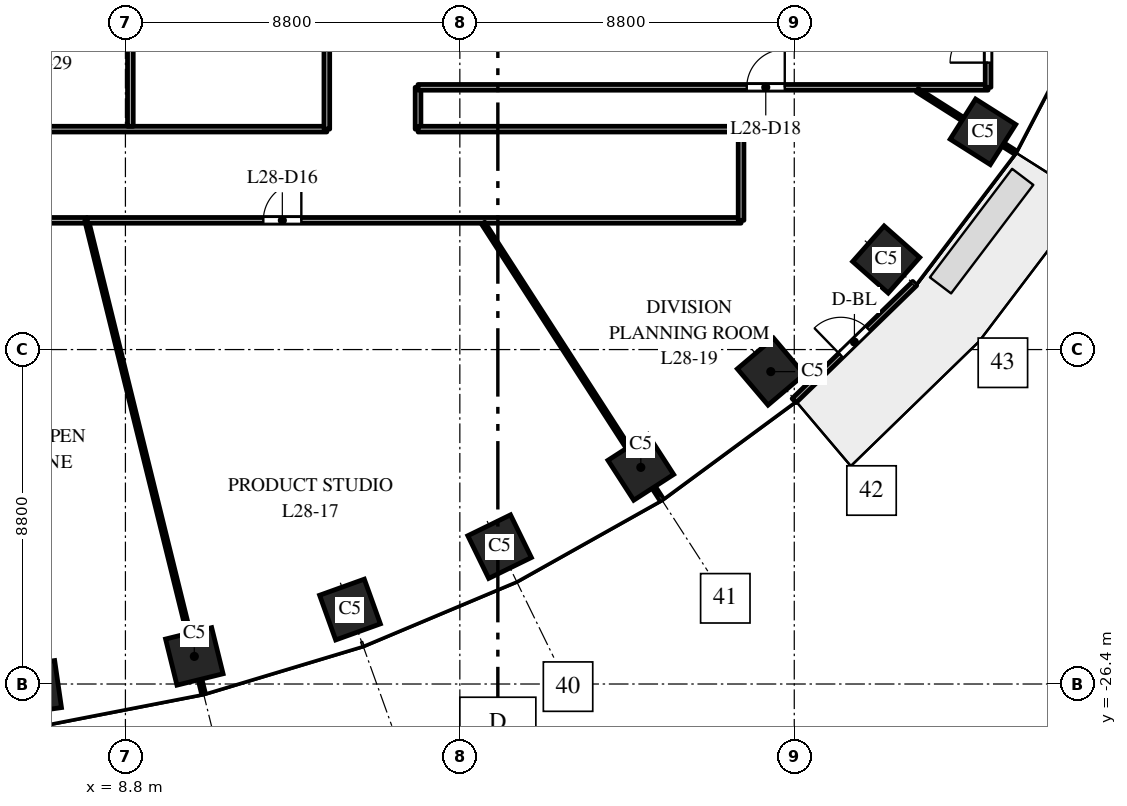
"""IFC4 building model, lengths in metres.
Left out: names, types, materials, properties, quantities, classifications, styles, units other than length and angle.
Written with IfcOpenShell. Run it as: python <this file> out.ifc"""

import sys

from ifc_helpers import new_model, si_unit, direction, frame, frame_2d, origin, origin_2d, place, context, subcontext, project, spatial, rectangle, extrude, element, fill, save


model = new_model("IFC4")
c1 = context("Model", 3, precision=1e-05, world=origin(), true_north=direction((0.0, 1.0)))
c2 = subcontext(c1, "Body", "Model", "MODEL_VIEW")
j1 = project(units=[si_unit("LENGTHUNIT", "METRE"), si_unit("PLANEANGLEUNIT", "RADIAN")], contexts=[c1])
p1 = place(None, origin())
s1 = spatial("IfcSite", under=j1, at=p1, CompositionType="ELEMENT")
p2 = place(p1, origin())
s2 = spatial("IfcBuilding", under=s1, at=p2, CompositionType="ELEMENT")
p3 = place(p2, frame((0.0, 0.0, 124.0)))
s3 = spatial("IfcBuildingStorey", under=s2, at=p3, CompositionType="ELEMENT", Elevation=124.0)
for number, where, z_axis, x_axis in (
    (1, (6.409, -26.491, 0.0), (0.0, 0.0, 1.0), (0.99, 0.143, 0.0)),
    (2, (10.613, -25.674, 0.0), (0.0, 0.0, 1.0), (0.971, 0.24, 0.0)),
    (3, (14.709, -24.441, 0.0), (0.0, 0.0, 1.0), (0.941, 0.338, 0.0)),
    (4, (18.646, -22.785, 0.0), (0.0, 0.0, 1.0), (0.898, 0.439, 0.0)),
    (5, (22.362, -20.7, 0.0), (0.0, 0.0, 1.0), (0.84, 0.542, 0.0)),
    (6, (25.783, -18.18, 0.0), (0.0, 0.0, 1.0), (0.763, 0.646, 0.0)),
    (7, (28.819, -15.23, 0.0), (0.0, 0.0, 1.0), (0.663, 0.749, 0.0)),
    (8, (31.365, -11.871, 0.0), (0.0, 0.0, 1.0), (0.535, 0.845, 0.0)),
):
    element("IfcColumn", number, at=place(p3, frame(where, z_axis=z_axis, x_axis=x_axis)), inside=s3, PredefinedType="COLUMN", context=c2, shape_type="SweptSolid", body=[
        extrude(rectangle(XDim=1.25, YDim=1.25, at=origin_2d()), origin(), (0.0, 0.0, 1.0), 4.0),
    ])
p4 = place(p3, frame((26.396, -18.943, 0.0), z_axis=(0.0, 0.0, 1.0), x_axis=(0.717214761864, 0.696852197647, 0.0)))
e9 = element("IfcWall", 9, at=p4, inside=s3, PredefinedType="STANDARD", context=c2, shape_type="SweptSolid", body=[
    extrude(rectangle(XDim=4.424, YDim=0.15, at=frame_2d((2.212, 0.0))), origin(), (0.0, 0.0, 1.0), 3.7),
])
p5 = place(p4, frame((1.712, 0.0, 0.0)))
e10 = element("IfcOpeningElement", 10, at=p5, cuts=e9, PredefinedType="OPENING", context=c2, shape_type="SweptSolid", body=[
    extrude(rectangle(XDim=1.0, YDim=2.4, at=frame_2d((0.5, 1.2))), frame((0.0, 0.085, 0.0), z_axis=(0.0, -1.0, 0.0), x_axis=(1.0, 0.0, 0.0)), (0.0, 0.0, 1.0), 0.17),
])
p6 = place(p3, frame((-14.1, -11.8, 0.0), z_axis=(0.0, 0.0, 1.0), x_axis=(1.0, 0.0, 0.0)))
e11 = element("IfcWall", 11, at=p6, inside=s3, PredefinedType="PARTITIONING", context=c2, shape_type="SweptSolid", body=[
    extrude(rectangle(XDim=28.2, YDim=0.15, at=frame_2d((14.1, 0.0))), origin(), (0.0, 0.0, 1.0), 2.85),
])
p7 = place(p6, frame((6.03, 0.0, 0.0)))
e12 = element("IfcOpeningElement", 12, at=p7, cuts=e11, PredefinedType="OPENING", context=c2, shape_type="SweptSolid", body=[
    extrude(rectangle(XDim=1.0, YDim=2.1, at=frame_2d((0.5, 1.05))), frame((0.0, 0.085, 0.0), z_axis=(0.0, -1.0, 0.0), x_axis=(1.0, 0.0, 0.0)), (0.0, 0.0, 1.0), 0.17),
])
p8 = place(p6, frame((10.73, 0.0, 0.0)))
e13 = element("IfcOpeningElement", 13, at=p8, cuts=e11, PredefinedType="OPENING", context=c2, shape_type="SweptSolid", body=[
    extrude(rectangle(XDim=1.0, YDim=2.1, at=frame_2d((0.5, 1.05))), frame((0.0, 0.085, 0.0), z_axis=(0.0, -1.0, 0.0), x_axis=(1.0, 0.0, 0.0)), (0.0, 0.0, 1.0), 0.17),
])
p9 = place(p6, frame((15.43, 0.0, 0.0)))
e14 = element("IfcOpeningElement", 14, at=p9, cuts=e11, PredefinedType="OPENING", context=c2, shape_type="SweptSolid", body=[
    extrude(rectangle(XDim=1.0, YDim=2.1, at=frame_2d((0.5, 1.05))), frame((0.0, 0.085, 0.0), z_axis=(0.0, -1.0, 0.0), x_axis=(1.0, 0.0, 0.0)), (0.0, 0.0, 1.0), 0.17),
])
p10 = place(p3, frame((0.563, -14.2, 0.0), z_axis=(0.0, 0.0, 1.0), x_axis=(1.0, 0.0, 0.0)))
e15 = element("IfcWall", 15, at=p10, inside=s3, PredefinedType="PARTITIONING", context=c2, shape_type="SweptSolid", body=[
    extrude(rectangle(XDim=7.216, YDim=0.15, at=frame_2d((3.608, 0.0))), origin(), (0.0, 0.0, 1.0), 2.85),
])
p11 = place(p10, frame((3.15, 0.0, 0.0)))
e16 = element("IfcOpeningElement", 16, at=p11, cuts=e15, PredefinedType="OPENING", context=c2, shape_type="SweptSolid", body=[
    extrude(rectangle(XDim=1.0, YDim=2.1, at=frame_2d((0.5, 1.05))), frame((0.0, 0.085, 0.0), z_axis=(0.0, -1.0, 0.0), x_axis=(1.0, 0.0, 0.0)), (0.0, 0.0, 1.0), 0.17),
])
p12 = place(p3, frame((7.779, -14.2, 0.0), z_axis=(0.0, 0.0, 1.0), x_axis=(0.239778914736, -0.970827519206, 0.0)))
e17 = element("IfcWall", 17, at=p12, inside=s3, PredefinedType="PARTITIONING", context=c2, shape_type="SweptSolid", body=[
    extrude(rectangle(XDim=12.82, YDim=0.1, at=frame_2d((6.41, 0.0))), origin(), (0.0, 0.0, 1.0), 2.9),
])
p13 = place(p3, frame((7.796, -14.2, 0.0), z_axis=(0.0, 0.0, 1.0), x_axis=(1.0, 0.0, 0.0)))
e18 = element("IfcWall", 18, at=p13, inside=s3, PredefinedType="PARTITIONING", context=c2, shape_type="SweptSolid", body=[
    extrude(rectangle(XDim=17.204, YDim=0.15, at=frame_2d((8.602, 0.0))), origin(), (0.0, 0.0, 1.0), 2.85),
])
p14 = place(p13, frame((4.633, 0.0, 0.0)))
e19 = element("IfcOpeningElement", 19, at=p14, cuts=e18, PredefinedType="OPENING", context=c2, shape_type="SweptSolid", body=[
    extrude(rectangle(XDim=1.0, YDim=2.1, at=frame_2d((0.5, 1.05))), frame((0.0, 0.085, 0.0), z_axis=(0.0, -1.0, 0.0), x_axis=(1.0, 0.0, 0.0)), (0.0, 0.0, 1.0), 0.17),
])
p15 = place(p3, frame((8.93, -11.725, 0.0), z_axis=(0.0, 0.0, 1.0), x_axis=(0.0, 1.0, 0.0)))
e20 = element("IfcWall", 20, at=p15, inside=s3, PredefinedType="PARTITIONING", context=c2, shape_type="SweptSolid", body=[
    extrude(rectangle(XDim=11.207, YDim=0.15, at=frame_2d((5.604, 0.0))), origin(), (0.0, 0.0, 1.0), 2.75),
])
p16 = place(p15, frame((4.597, 0.0, 0.0)))
e21 = element("IfcOpeningElement", 21, at=p16, cuts=e20, PredefinedType="OPENING", context=c2, shape_type="SweptSolid", body=[
    extrude(rectangle(XDim=1.0, YDim=2.1, at=frame_2d((0.5, 1.05))), frame((0.0, 0.085, 0.0), z_axis=(0.0, -1.0, 0.0), x_axis=(1.0, 0.0, 0.0)), (0.0, 0.0, 1.0), 0.17),
])
p17 = place(p3, frame((14.1, -11.8, 0.0), z_axis=(0.0, 0.0, 1.0), x_axis=(0.0, 1.0, 0.0)))
e22 = element("IfcWall", 22, at=p17, inside=s3, PredefinedType="PARTITIONING", context=c2, shape_type="SweptSolid", body=[
    extrude(rectangle(XDim=23.6, YDim=0.15, at=frame_2d((11.8, 0.0))), origin(), (0.0, 0.0, 1.0), 2.75),
])
p18 = place(p17, frame((11.2, 0.0, 0.0)))
e23 = element("IfcOpeningElement", 23, at=p18, cuts=e22, PredefinedType="OPENING", context=c2, shape_type="SweptSolid", body=[
    extrude(rectangle(XDim=1.0, YDim=2.1, at=frame_2d((0.5, 1.05))), frame((0.0, 0.085, 0.0), z_axis=(0.0, -1.0, 0.0), x_axis=(1.0, 0.0, 0.0)), (0.0, 0.0, 1.0), 0.17),
])
p19 = place(p3, frame((16.5, -11.8, 0.0), z_axis=(0.0, 0.0, 1.0), x_axis=(0.0, 1.0, 0.0)))
e24 = element("IfcWall", 24, at=p19, inside=s3, PredefinedType="PARTITIONING", context=c2, shape_type="SweptSolid", body=[
    extrude(rectangle(XDim=1.1, YDim=0.15, at=frame_2d((0.55, 0.0))), origin(), (0.0, 0.0, 1.0), 3.7),
])
p20 = place(p3, frame((16.5, -11.8, 0.0), z_axis=(0.0, 0.0, 1.0), x_axis=(1.0, 0.0, 0.0)))
e25 = element("IfcWall", 25, at=p20, inside=s3, PredefinedType="PARTITIONING", context=c2, shape_type="SweptSolid", body=[
    extrude(rectangle(XDim=8.5, YDim=0.15, at=frame_2d((4.25, 0.0))), origin(), (0.0, 0.0, 1.0), 2.75),
])
p21 = place(p3, frame((16.5, -10.7, 0.0), z_axis=(0.0, 0.0, 1.0), x_axis=(1.0, 0.0, 0.0)))
e26 = element("IfcWall", 26, at=p21, inside=s3, PredefinedType="PARTITIONING", context=c2, shape_type="SweptSolid", body=[
    extrude(rectangle(XDim=15.0, YDim=0.15, at=frame_2d((7.5, 0.0))), origin(), (0.0, 0.0, 1.0), 2.75),
])
p22 = place(p21, frame((8.65, 0.0, 0.0)))
e27 = element("IfcOpeningElement", 27, at=p22, cuts=e26, PredefinedType="OPENING", context=c2, shape_type="SweptSolid", body=[
    extrude(rectangle(XDim=1.0, YDim=2.1, at=frame_2d((0.5, 1.05))), frame((0.0, 0.085, 0.0), z_axis=(0.0, -1.0, 0.0), x_axis=(1.0, 0.0, 0.0)), (0.0, 0.0, 1.0), 0.17),
])
p23 = place(p3, frame((18.215, -14.275, 0.0), z_axis=(0.0, 0.0, 1.0), x_axis=(0.542249023969, -0.840217826521, 0.0)))
e28 = element("IfcWall", 28, at=p23, inside=s3, PredefinedType="PARTITIONING", context=c2, shape_type="SweptSolid", body=[
    extrude(rectangle(XDim=8.649, YDim=0.1, at=frame_2d((4.325, 0.0))), origin(), (0.0, 0.0, 1.0), 3.7),
])
p24 = place(p3, frame((25.0, -14.2, 0.0), z_axis=(0.0, 0.0, 1.0), x_axis=(0.0, 1.0, 0.0)))
e29 = element("IfcWall", 29, at=p24, inside=s3, PredefinedType="PARTITIONING", context=c2, shape_type="SweptSolid", body=[
    extrude(rectangle(XDim=2.4, YDim=0.15, at=frame_2d((1.2, 0.0))), origin(), (0.0, 0.0, 1.0), 2.75),
])
p25 = place(p3, frame((29.637, -10.777, 0.0), z_axis=(0.0, 0.0, 1.0), x_axis=(0.844810627195, -0.535065420467, 0.0)))
e30 = element("IfcWall", 30, at=p25, inside=s3, PredefinedType="PARTITIONING", context=c2, shape_type="SweptSolid", body=[
    extrude(rectangle(XDim=3.048, YDim=0.1, at=frame_2d((1.524, 0.0))), origin(), (0.0, 0.0, 1.0), 2.9),
])
p26 = place(p3, frame((31.5, -10.7, 0.0), z_axis=(0.0, 0.0, 1.0), x_axis=(0.0, 1.0, 0.0)))
e31 = element("IfcWall", 31, at=p26, inside=s3, PredefinedType="PARTITIONING", context=c2, shape_type="SweptSolid", body=[
    extrude(rectangle(XDim=2.2, YDim=0.15, at=frame_2d((1.1, 0.0))), origin(), (0.0, 0.0, 1.0), 2.9),
])
p27 = place(p26, frame((0.65, 0.0, 0.0)))
e32 = element("IfcOpeningElement", 32, at=p27, cuts=e31, PredefinedType="OPENING", context=c2, shape_type="SweptSolid", body=[
    extrude(rectangle(XDim=1.0, YDim=2.1, at=frame_2d((0.5, 1.05))), frame((0.0, 0.085, 0.0), z_axis=(0.0, -1.0, 0.0), x_axis=(1.0, 0.0, 0.0)), (0.0, 0.0, 1.0), 0.17),
])
p28 = place(p5, origin())
e33 = element("IfcDoor", 33, at=p28, inside=s3, OperationType="SINGLE_SWING_LEFT", PredefinedType="DOOR", context=c2, shape_type="SweptSolid", body=[
    extrude(rectangle(XDim=1.0, YDim=2.4, at=frame_2d((0.5, 1.2))), frame((0.0, 0.025, 0.0), z_axis=(0.0, -1.0, 0.0), x_axis=(1.0, 0.0, 0.0)), (0.0, 0.0, 1.0), 0.05),
])
fill(e10, e33)
p29 = place(p14, origin())
e34 = element("IfcDoor", 34, at=p29, inside=s3, OperationType="SINGLE_SWING_RIGHT", PredefinedType="DOOR", context=c2, shape_type="SweptSolid", body=[
    extrude(rectangle(XDim=1.0, YDim=2.1, at=frame_2d((0.5, 1.05))), frame((0.0, 0.025, 0.0), z_axis=(0.0, -1.0, 0.0), x_axis=(1.0, 0.0, 0.0)), (0.0, 0.0, 1.0), 0.05),
])
fill(e19, e34)
p30 = place(p22, origin())
e35 = element("IfcDoor", 35, at=p30, inside=s3, OperationType="SINGLE_SWING_RIGHT", PredefinedType="DOOR", context=c2, shape_type="SweptSolid", body=[
    extrude(rectangle(XDim=1.0, YDim=2.1, at=frame_2d((0.5, 1.05))), frame((0.0, 0.025, 0.0), z_axis=(0.0, -1.0, 0.0), x_axis=(1.0, 0.0, 0.0)), (0.0, 0.0, 1.0), 0.05),
])
fill(e27, e35)
p31 = place(p27, origin())
e36 = element("IfcDoor", 36, at=p31, inside=s3, OperationType="SINGLE_SWING_LEFT", PredefinedType="DOOR", context=c2, shape_type="SweptSolid", body=[
    extrude(rectangle(XDim=1.0, YDim=2.1, at=frame_2d((0.5, 1.05))), frame((0.0, 0.025, 0.0), z_axis=(0.0, -1.0, 0.0), x_axis=(1.0, 0.0, 0.0)), (0.0, 0.0, 1.0), 0.05),
])
fill(e32, e36)
save(model, sys.argv[1])
